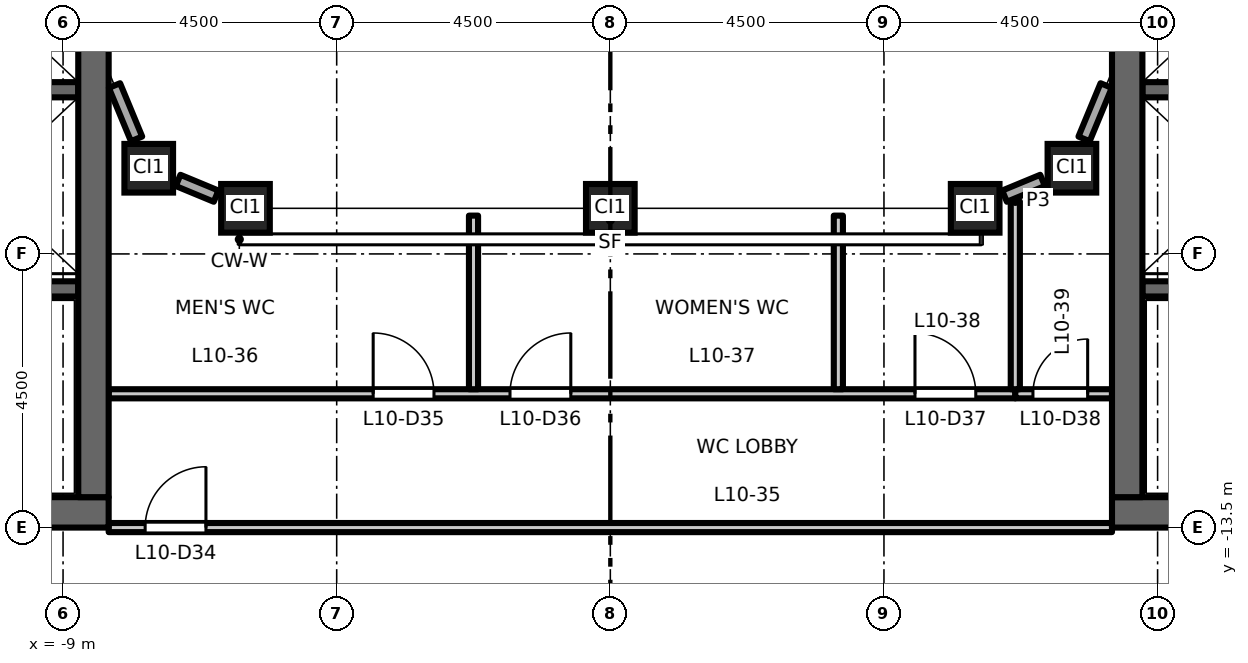
"""IFC4 building model, lengths in metres.
Left out: names, types, materials, properties, quantities, classifications, styles, units other than length and angle.
Written with IfcOpenShell. Run it as: python <this file> out.ifc"""

import sys

from ifc_helpers import new_model, si_unit, direction, frame, frame_2d, origin, origin_2d, place, context, subcontext, project, spatial, rectangle, hollow_rectangle, extrude, element, fill, save


model = new_model("IFC4")
c1 = context("Model", 3, precision=1e-05, world=origin(), true_north=direction((0.0, 1.0)))
c2 = subcontext(c1, "Body", "Model", "MODEL_VIEW")
j1 = project(units=[si_unit("LENGTHUNIT", "METRE"), si_unit("PLANEANGLEUNIT", "RADIAN")], contexts=[c1])
p1 = place(None, origin())
s1 = spatial("IfcSite", under=j1, at=p1, CompositionType="ELEMENT")
p2 = place(p1, origin())
s2 = spatial("IfcBuilding", under=s1, at=p2, CompositionType="ELEMENT")
p3 = place(p2, frame((0.0, 0.0, 49.2)))
s3 = spatial("IfcBuildingStorey", under=s2, at=p3, CompositionType="ELEMENT", Elevation=49.2)
for number, where, z_axis, x_axis in (
    (1, (-7.591, -7.591, 0.0), (0.0, 0.0, 1.0), (1.0, 0.0, 0.0)),
    (2, (-6.0, -8.25, 0.0), (0.0, 0.0, 1.0), (1.0, 0.0, 0.0)),
    (3, (0.0, -8.25, 0.0), (0.0, 0.0, 1.0), (1.0, 0.0, 0.0)),
    (4, (6.0, -8.25, 0.0), (0.0, 0.0, 1.0), (1.0, 0.0, 0.0)),
    (5, (7.591, -7.591, 0.0), (0.0, 0.0, 1.0), (1.0, 0.0, 0.0)),
):
    element("IfcColumn", number, at=place(p3, frame(where, z_axis=z_axis, x_axis=x_axis)), inside=s3, PredefinedType="COLUMN", context=c2, shape_type="SweptSolid", body=[
        extrude(hollow_rectangle(XDim=0.8, YDim=0.8, WallThickness=0.05, at=origin_2d()), origin(), (0.0, 0.0, 1.0), 4.5),
    ])
p4 = place(p3, frame((-8.75, -6.3, 0.0), z_axis=(0.0, 0.0, 1.0), x_axis=(-1.0, 0.0, 0.0)))
e6 = element("IfcWall", 6, at=p4, inside=s3, PredefinedType="SHEAR", context=c2, shape_type="SweptSolid", body=[
    extrude(rectangle(XDim=3.1, YDim=0.25, at=frame_2d((1.55, 0.0))), origin(), (0.0, 0.0, 1.0), 4.35),
])
p5 = place(p3, frame((-8.75, -9.575, 0.0), z_axis=(0.0, 0.0, 1.0), x_axis=(-1.0, 0.0, 0.0)))
e7 = element("IfcWall", 7, at=p5, inside=s3, PredefinedType="SHEAR", context=c2, shape_type="SweptSolid", body=[
    extrude(rectangle(XDim=8.0, YDim=0.25, at=frame_2d((4.0, 0.0))), origin(), (0.0, 0.0, 1.0), 4.35),
])
p6 = place(p5, frame((6.65, 0.0, 0.0)))
e8 = element("IfcOpeningElement", 8, at=p6, cuts=e7, PredefinedType="OPENING", context=c2, shape_type="SweptSolid", body=[
    extrude(rectangle(XDim=1.1, YDim=2.1, at=frame_2d((0.55, 1.05))), frame((0.0, 0.135, 0.0), z_axis=(0.0, -1.0, 0.0), x_axis=(1.0, 0.0, 0.0)), (0.0, 0.0, 1.0), 0.27),
])
p7 = place(p3, frame((-8.25, -13.25, 0.0), z_axis=(0.0, 0.0, 1.0), x_axis=(-1.0, 0.0, 0.0)))
e9 = element("IfcWall", 9, at=p7, inside=s3, PredefinedType="SHEAR", context=c2, shape_type="SweptSolid", body=[
    extrude(rectangle(XDim=13.5, YDim=0.5, at=frame_2d((6.75, 0.0))), origin(), (0.0, 0.0, 1.0), 4.35),
])
p8 = place(p3, frame((-8.5, -13.0, 0.0), z_axis=(0.0, 0.0, 1.0), x_axis=(0.0, 1.0, 0.0)))
e10 = element("IfcWall", 10, at=p8, inside=s3, PredefinedType="SHEAR", context=c2, shape_type="SweptSolid", body=[
    extrude(rectangle(XDim=26.0, YDim=0.5, at=frame_2d((13.0, 0.0))), origin(), (0.0, 0.0, 1.0), 4.35),
])
p9 = place(p3, frame((8.75, -6.3, 0.0), z_axis=(0.0, 0.0, 1.0), x_axis=(1.0, 0.0, 0.0)))
e11 = element("IfcWall", 11, at=p9, inside=s3, PredefinedType="SHEAR", context=c2, shape_type="SweptSolid", body=[
    extrude(rectangle(XDim=3.1, YDim=0.25, at=frame_2d((1.55, 0.0))), origin(), (0.0, 0.0, 1.0), 4.35),
])
p10 = place(p3, frame((8.75, -9.575, 0.0), z_axis=(0.0, 0.0, 1.0), x_axis=(1.0, 0.0, 0.0)))
e12 = element("IfcWall", 12, at=p10, inside=s3, PredefinedType="SHEAR", context=c2, shape_type="SweptSolid", body=[
    extrude(rectangle(XDim=8.0, YDim=0.25, at=frame_2d((4.0, 0.0))), origin(), (0.0, 0.0, 1.0), 4.35),
])
p11 = place(p10, frame((6.65, 0.0, 0.0)))
e13 = element("IfcOpeningElement", 13, at=p11, cuts=e12, PredefinedType="OPENING", context=c2, shape_type="SweptSolid", body=[
    extrude(rectangle(XDim=1.1, YDim=2.1, at=frame_2d((0.55, 1.05))), frame((0.0, 0.135, 0.0), z_axis=(0.0, -1.0, 0.0), x_axis=(1.0, 0.0, 0.0)), (0.0, 0.0, 1.0), 0.27),
])
p12 = place(p3, frame((8.25, -13.25, 0.0), z_axis=(0.0, 0.0, 1.0), x_axis=(1.0, 0.0, 0.0)))
e14 = element("IfcWall", 14, at=p12, inside=s3, PredefinedType="SHEAR", context=c2, shape_type="SweptSolid", body=[
    extrude(rectangle(XDim=13.5, YDim=0.5, at=frame_2d((6.75, 0.0))), origin(), (0.0, 0.0, 1.0), 4.35),
])
p13 = place(p3, frame((8.5, -13.0, 0.0), z_axis=(0.0, 0.0, 1.0), x_axis=(0.0, 1.0, 0.0)))
e15 = element("IfcWall", 15, at=p13, inside=s3, PredefinedType="SHEAR", context=c2, shape_type="SweptSolid", body=[
    extrude(rectangle(XDim=26.0, YDim=0.5, at=frame_2d((13.0, 0.0))), origin(), (0.0, 0.0, 1.0), 4.35),
])
p14 = place(p3, frame((6.483, -8.05, 0.0), z_axis=(0.0, 0.0, 1.0), x_axis=(0.923854141361, 0.382744726273, 0.0)))
e16 = element("IfcWall", 16, at=p14, inside=s3, PredefinedType="STANDARD", context=c2, shape_type="SweptSolid", body=[
    extrude(rectangle(XDim=0.677, YDim=0.2, at=frame_2d((0.338, 0.0))), origin(), (0.0, 0.0, 1.0), 3.73),
])
for number, where, z_axis, x_axis in (
    (17, (7.791, -7.108, 0.0), (0.0, 0.0, 1.0), (0.383, 0.924, 0.0)),
    (18, (-8.154, -6.231, 0.0), (0.0, 0.0, 1.0), (0.383, -0.924, 0.0)),
):
    element("IfcWall", number, at=place(p3, frame(where, z_axis=z_axis, x_axis=x_axis)), inside=s3, PredefinedType="STANDARD", context=c2, shape_type="SweptSolid", body=[
        extrude(rectangle(XDim=0.949, YDim=0.2, at=frame_2d((0.475, 0.0))), origin(), (0.0, 0.0, 1.0), 3.73),
    ])
p15 = place(p3, frame((-7.108, -7.791, 0.0), z_axis=(0.0, 0.0, 1.0), x_axis=(0.923854141361, -0.382744726273, 0.0)))
e19 = element("IfcWall", 19, at=p15, inside=s3, PredefinedType="STANDARD", context=c2, shape_type="SweptSolid", body=[
    extrude(rectangle(XDim=0.677, YDim=0.2, at=frame_2d((0.338, 0.0))), origin(), (0.0, 0.0, 1.0), 3.73),
])
p16 = place(p3, frame((-8.25, -13.5, 0.0), z_axis=(0.0, 0.0, 1.0), x_axis=(1.0, 0.0, 0.0)))
e20 = element("IfcWall", 20, at=p16, inside=s3, PredefinedType="PARTITIONING", context=c2, shape_type="SweptSolid", body=[
    extrude(rectangle(XDim=16.5, YDim=0.15, at=frame_2d((8.25, 0.0))), origin(), (0.0, 0.0, 1.0), 3.85),
])
p17 = place(p16, frame((0.6, 0.0, 0.0)))
e21 = element("IfcOpeningElement", 21, at=p17, cuts=e20, PredefinedType="OPENING", context=c2, shape_type="SweptSolid", body=[
    extrude(rectangle(XDim=1.0, YDim=2.1, at=frame_2d((0.5, 1.05))), frame((0.0, 0.085, 0.0), z_axis=(0.0, -1.0, 0.0), x_axis=(1.0, 0.0, 0.0)), (0.0, 0.0, 1.0), 0.17),
])
p18 = place(p3, frame((-8.25, -11.3, 0.0), z_axis=(0.0, 0.0, 1.0), x_axis=(1.0, 0.0, 0.0)))
e22 = element("IfcWall", 22, at=p18, inside=s3, PredefinedType="PARTITIONING", context=c2, shape_type="SweptSolid", body=[
    extrude(rectangle(XDim=14.91, YDim=0.15, at=frame_2d((7.455, 0.0))), origin(), (0.0, 0.0, 1.0), 4.35),
])
p19 = place(p18, frame((4.35, 0.0, 0.0)))
e23 = element("IfcOpeningElement", 23, at=p19, cuts=e22, PredefinedType="OPENING", context=c2, shape_type="SweptSolid", body=[
    extrude(rectangle(XDim=1.0, YDim=2.1, at=frame_2d((0.5, 1.05))), frame((0.0, 0.085, 0.0), z_axis=(0.0, -1.0, 0.0), x_axis=(1.0, 0.0, 0.0)), (0.0, 0.0, 1.0), 0.17),
])
p20 = place(p18, frame((6.6, 0.0, 0.0)))
e24 = element("IfcOpeningElement", 24, at=p20, cuts=e22, PredefinedType="OPENING", context=c2, shape_type="SweptSolid", body=[
    extrude(rectangle(XDim=1.0, YDim=2.1, at=frame_2d((0.5, 1.05))), frame((0.0, 0.085, 0.0), z_axis=(0.0, -1.0, 0.0), x_axis=(1.0, 0.0, 0.0)), (0.0, 0.0, 1.0), 0.17),
])
p21 = place(p18, frame((13.26, 0.0, 0.0)))
e25 = element("IfcOpeningElement", 25, at=p21, cuts=e22, PredefinedType="OPENING", context=c2, shape_type="SweptSolid", body=[
    extrude(rectangle(XDim=1.0, YDim=2.1, at=frame_2d((0.5, 1.05))), frame((0.0, 0.085, 0.0), z_axis=(0.0, -1.0, 0.0), x_axis=(1.0, 0.0, 0.0)), (0.0, 0.0, 1.0), 0.17),
])
p22 = place(p3, frame((6.66, -11.3, 0.0), z_axis=(0.0, 0.0, 1.0), x_axis=(1.0, 0.0, 0.0)))
e26 = element("IfcWall", 26, at=p22, inside=s3, PredefinedType="PARTITIONING", context=c2, shape_type="SweptSolid", body=[
    extrude(rectangle(XDim=1.59, YDim=0.15, at=frame_2d((0.795, 0.0))), origin(), (0.0, 0.0, 1.0), 4.35),
])
p23 = place(p22, frame((0.29, 0.0, 0.0)))
e27 = element("IfcOpeningElement", 27, at=p23, cuts=e26, PredefinedType="OPENING", context=c2, shape_type="SweptSolid", body=[
    extrude(rectangle(XDim=0.9, YDim=2.1, at=frame_2d((0.45, 1.05))), frame((0.0, 0.085, 0.0), z_axis=(0.0, -1.0, 0.0), x_axis=(1.0, 0.0, 0.0)), (0.0, 0.0, 1.0), 0.17),
])
for number, where, z_axis, x_axis in (
    (28, (-2.25, -11.225, 0.0), (0.0, 0.0, 1.0), (0.0, 1.0, 0.0)),
    (29, (3.75, -11.225, 0.0), (0.0, 0.0, 1.0), (0.0, 1.0, 0.0)),
):
    element("IfcWall", number, at=place(p3, frame(where, z_axis=z_axis, x_axis=x_axis)), inside=s3, PredefinedType="PARTITIONING", context=c2, shape_type="SweptSolid", body=[
        extrude(rectangle(XDim=2.855, YDim=0.15, at=frame_2d((1.427, 0.0))), origin(), (0.0, 0.0, 1.0), 4.35),
    ])
p24 = place(p3, frame((6.66, -11.225, 0.0), z_axis=(0.0, 0.0, 1.0), x_axis=(0.0, 1.0, 0.0)))
e30 = element("IfcWall", 30, at=p24, inside=s3, PredefinedType="PARTITIONING", context=c2, shape_type="SweptSolid", body=[
    extrude(rectangle(XDim=3.089, YDim=0.15, at=frame_2d((1.544, 0.0))), origin(), (0.0, 0.0, 1.0), 4.35),
])
p25 = place(p17, origin())
e31 = element("IfcDoor", 31, at=p25, inside=s3, OperationType="SINGLE_SWING_RIGHT", PredefinedType="DOOR", context=c2, shape_type="SweptSolid", body=[
    extrude(rectangle(XDim=1.0, YDim=2.1, at=frame_2d((0.5, 1.05))), frame((0.0, 0.025, 0.0), z_axis=(0.0, -1.0, 0.0), x_axis=(1.0, 0.0, 0.0)), (0.0, 0.0, 1.0), 0.05),
])
fill(e21, e31)
p26 = place(p19, origin())
e32 = element("IfcDoor", 32, at=p26, inside=s3, OperationType="SINGLE_SWING_LEFT", PredefinedType="DOOR", context=c2, shape_type="SweptSolid", body=[
    extrude(rectangle(XDim=1.0, YDim=2.1, at=frame_2d((0.5, 1.05))), frame((0.0, 0.025, 0.0), z_axis=(0.0, -1.0, 0.0), x_axis=(1.0, 0.0, 0.0)), (0.0, 0.0, 1.0), 0.05),
])
fill(e23, e32)
p27 = place(p20, origin())
e33 = element("IfcDoor", 33, at=p27, inside=s3, OperationType="SINGLE_SWING_RIGHT", PredefinedType="DOOR", context=c2, shape_type="SweptSolid", body=[
    extrude(rectangle(XDim=1.0, YDim=2.1, at=frame_2d((0.5, 1.05))), frame((0.0, 0.025, 0.0), z_axis=(0.0, -1.0, 0.0), x_axis=(1.0, 0.0, 0.0)), (0.0, 0.0, 1.0), 0.05),
])
fill(e24, e33)
p28 = place(p21, origin())
e34 = element("IfcDoor", 34, at=p28, inside=s3, OperationType="SINGLE_SWING_LEFT", PredefinedType="DOOR", context=c2, shape_type="SweptSolid", body=[
    extrude(rectangle(XDim=1.0, YDim=2.1, at=frame_2d((0.5, 1.05))), frame((0.0, 0.025, 0.0), z_axis=(0.0, -1.0, 0.0), x_axis=(1.0, 0.0, 0.0)), (0.0, 0.0, 1.0), 0.05),
])
fill(e25, e34)
p29 = place(p23, origin())
e35 = element("IfcDoor", 35, at=p29, inside=s3, OperationType="SINGLE_SWING_RIGHT", PredefinedType="DOOR", context=c2, shape_type="SweptSolid", body=[
    extrude(rectangle(XDim=0.9, YDim=2.1, at=frame_2d((0.45, 1.05))), frame((0.0, 0.025, 0.0), z_axis=(0.0, -1.0, 0.0), x_axis=(1.0, 0.0, 0.0)), (0.0, 0.0, 1.0), 0.05),
])
fill(e27, e35)
save(model, sys.argv[1])
